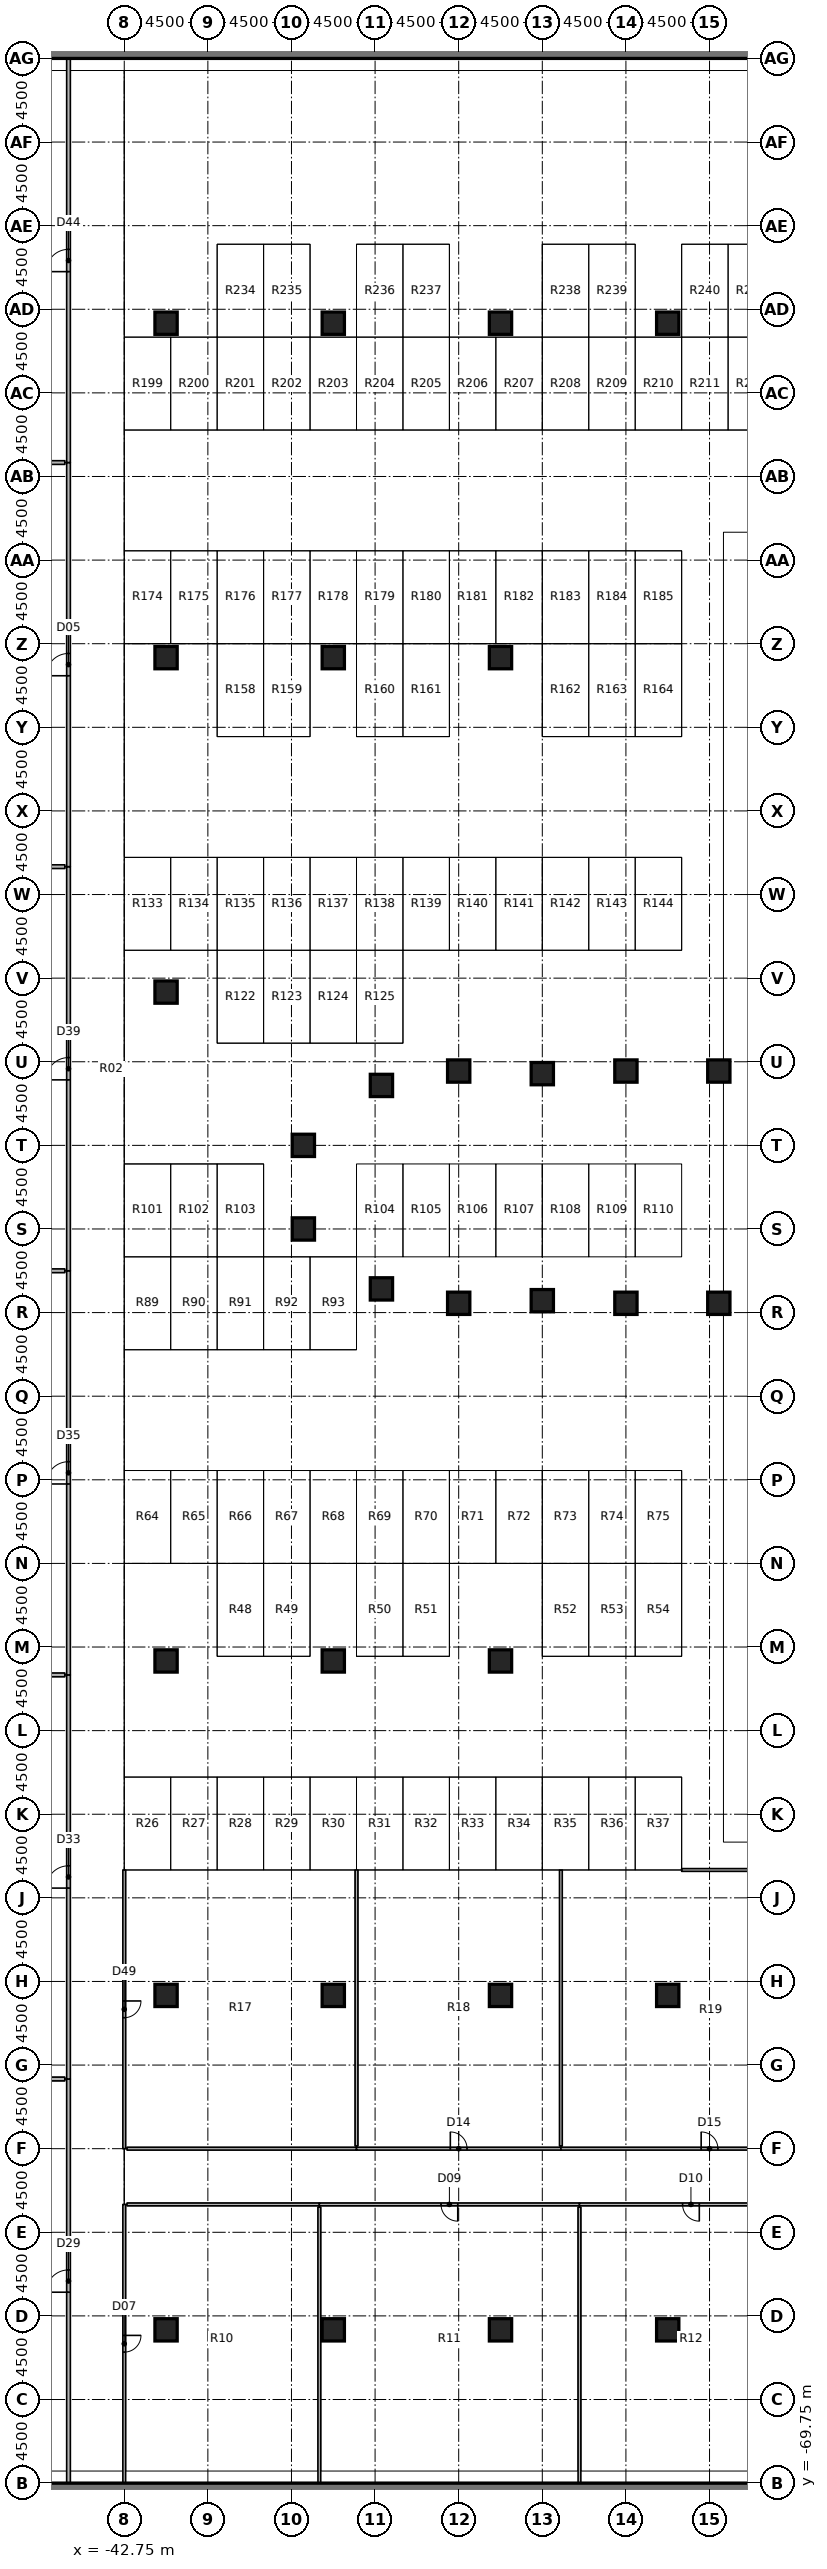
"""IFC4 building model, lengths in metres.
Left out: names, types, materials, properties, quantities, classifications, styles, units other than length and angle.
Written with IfcOpenShell. Run it as: python <this file> out.ifc"""

import sys

from ifc_helpers import new_model, si_unit, direction, frame, frame_2d, origin, origin_2d, place, context, subcontext, project, spatial, rectangle, extrude, element, fill, save


model = new_model("IFC4")
c1 = context("Model", 3, precision=1e-05, world=origin(), true_north=direction((0.0, 1.0)))
c2 = subcontext(c1, "Body", "Model", "MODEL_VIEW")
j1 = project(units=[si_unit("LENGTHUNIT", "METRE"), si_unit("PLANEANGLEUNIT", "RADIAN")], contexts=[c1])
p1 = place(None, origin())
s1 = spatial("IfcSite", under=j1, at=p1, CompositionType="ELEMENT")
p2 = place(p1, origin())
s2 = spatial("IfcBuilding", under=s1, at=p2, CompositionType="ELEMENT")
p3 = place(p2, frame((0.0, 0.0, -4.0)))
s3 = spatial("IfcBuildingStorey", under=s2, at=p3, CompositionType="ELEMENT", Elevation=-4.0)
for number, where, z_axis, x_axis in (
    (1, (-40.5, -61.5, 0.0), (0.0, 0.0, 1.0), (1.0, 0.0, 0.0)),
    (2, (-40.5, -43.5, 0.0), (0.0, 0.0, 1.0), (1.0, 0.0, 0.0)),
    (3, (-40.5, -25.5, 0.0), (0.0, 0.0, 1.0), (1.0, 0.0, 0.0)),
    (4, (-40.5, 10.5, 0.0), (0.0, 0.0, 1.0), (1.0, 0.0, 0.0)),
    (5, (-40.5, 28.5, 0.0), (0.0, 0.0, 1.0), (1.0, 0.0, 0.0)),
    (6, (-40.5, 46.5, 0.0), (0.0, 0.0, 1.0), (1.0, 0.0, 0.0)),
    (7, (-33.11, -2.25, 0.0), (0.0, 0.0, 1.0), (1.0, 0.0, 0.0)),
    (8, (-33.11, 2.25, 0.0), (0.0, 0.0, 1.0), (1.0, 0.0, 0.0)),
    (9, (-31.5, -61.5, 0.0), (0.0, 0.0, 1.0), (1.0, 0.0, 0.0)),
    (10, (-31.5, -43.5, 0.0), (0.0, 0.0, 1.0), (1.0, 0.0, 0.0)),
    (11, (-31.5, -25.5, 0.0), (0.0, 0.0, 1.0), (1.0, 0.0, 0.0)),
    (12, (-31.5, 28.5, 0.0), (0.0, 0.0, 1.0), (1.0, 0.0, 0.0)),
    (13, (-31.5, 46.5, 0.0), (0.0, 0.0, 1.0), (1.0, 0.0, 0.0)),
    (14, (-28.908, -5.475, 0.0), (0.0, 0.0, 1.0), (1.0, 0.0, 0.0)),
    (15, (-28.908, 5.475, 0.0), (0.0, 0.0, 1.0), (1.0, 0.0, 0.0)),
    (16, (-24.75, -6.25, 0.0), (0.0, 0.0, 1.0), (1.0, 0.0, 0.0)),
    (17, (-24.75, 6.25, 0.0), (0.0, 0.0, 1.0), (1.0, 0.0, 0.0)),
    (18, (-22.5, -61.5, 0.0), (0.0, 0.0, 1.0), (1.0, 0.0, 0.0)),
    (19, (-22.5, -43.5, 0.0), (0.0, 0.0, 1.0), (1.0, 0.0, 0.0)),
    (20, (-22.5, -25.5, 0.0), (0.0, 0.0, 1.0), (1.0, 0.0, 0.0)),
    (21, (-22.5, 28.5, 0.0), (0.0, 0.0, 1.0), (1.0, 0.0, 0.0)),
    (22, (-22.5, 46.5, 0.0), (0.0, 0.0, 1.0), (1.0, 0.0, 0.0)),
    (23, (-20.25, -6.11, 0.0), (0.0, 0.0, 1.0), (1.0, 0.0, 0.0)),
    (24, (-20.25, 6.11, 0.0), (0.0, 0.0, 1.0), (1.0, 0.0, 0.0)),
    (25, (-15.75, -6.25, 0.0), (0.0, 0.0, 1.0), (1.0, 0.0, 0.0)),
    (26, (-15.75, 6.25, 0.0), (0.0, 0.0, 1.0), (1.0, 0.0, 0.0)),
    (27, (-13.5, -61.5, 0.0), (0.0, 0.0, 1.0), (1.0, 0.0, 0.0)),
    (28, (-13.5, -43.5, 0.0), (0.0, 0.0, 1.0), (1.0, 0.0, 0.0)),
    (29, (-13.5, 46.5, 0.0), (0.0, 0.0, 1.0), (1.0, 0.0, 0.0)),
    (30, (-10.75, -6.25, 0.0), (0.0, 0.0, 1.0), (1.0, 0.0, 0.0)),
    (31, (-10.75, 6.25, 0.0), (0.0, 0.0, 1.0), (1.0, 0.0, 0.0)),
):
    element("IfcColumn", number, at=place(p3, frame(where, z_axis=z_axis, x_axis=x_axis)), inside=s3, PredefinedType="COLUMN", context=c2, shape_type="SweptSolid", body=[
        extrude(rectangle(XDim=1.2, YDim=1.2, at=origin_2d()), origin(), (0.0, 0.0, 1.0), 3.1),
    ])
for number, where, z_axis, x_axis in (
    (32, (-61.25, -70.0, 0.0), (0.0, 0.0, 1.0), (1.0, 0.0, 0.0)),
    (33, (-61.25, 61.0, 0.0), (0.0, 0.0, 1.0), (1.0, 0.0, 0.0)),
):
    element("IfcWall", number, at=place(p3, frame(where, z_axis=z_axis, x_axis=x_axis)), inside=s3, PredefinedType="SOLIDWALL", context=c2, shape_type="SweptSolid", body=[
        extrude(rectangle(XDim=122.5, YDim=0.5, at=frame_2d((61.25, 0.0))), origin(), (0.0, 0.0, 1.0), 4.0),
    ])
p4 = place(p3, frame((-45.75, -69.75, 0.0), z_axis=(0.0, 0.0, 1.0), x_axis=(0.0, 1.0, 0.0)))
e34 = element("IfcWall", 34, at=p4, inside=s3, PredefinedType="PARTITIONING", context=c2, shape_type="SweptSolid", body=[
    extrude(rectangle(XDim=21.75, YDim=0.2, at=frame_2d((10.875, 0.0))), origin(), (0.0, 0.0, 1.0), 3.1),
])
p5 = place(p4, frame((10.275, 0.0, 0.0)))
e35 = element("IfcOpeningElement", 35, at=p5, cuts=e34, PredefinedType="OPENING", context=c2, shape_type="SweptSolid", body=[
    extrude(rectangle(XDim=1.2, YDim=2.1, at=frame_2d((0.6, 1.05))), frame((0.0, 0.11, 0.0), z_axis=(0.0, -1.0, 0.0), x_axis=(1.0, 0.0, 0.0)), (0.0, 0.0, 1.0), 0.22),
])
p6 = place(p3, frame((-45.75, -48.0, 0.0), z_axis=(0.0, 0.0, 1.0), x_axis=(0.0, 1.0, 0.0)))
e36 = element("IfcWall", 36, at=p6, inside=s3, PredefinedType="PARTITIONING", context=c2, shape_type="SweptSolid", body=[
    extrude(rectangle(XDim=21.75, YDim=0.2, at=frame_2d((10.875, 0.0))), origin(), (0.0, 0.0, 1.0), 3.1),
])
p7 = place(p6, frame((10.275, 0.0, 0.0)))
e37 = element("IfcOpeningElement", 37, at=p7, cuts=e36, PredefinedType="OPENING", context=c2, shape_type="SweptSolid", body=[
    extrude(rectangle(XDim=1.2, YDim=2.1, at=frame_2d((0.6, 1.05))), frame((0.0, 0.11, 0.0), z_axis=(0.0, -1.0, 0.0), x_axis=(1.0, 0.0, 0.0)), (0.0, 0.0, 1.0), 0.22),
])
p8 = place(p3, frame((-45.75, -26.25, 0.0), z_axis=(0.0, 0.0, 1.0), x_axis=(0.0, 1.0, 0.0)))
e38 = element("IfcWall", 38, at=p8, inside=s3, PredefinedType="PARTITIONING", context=c2, shape_type="SweptSolid", body=[
    extrude(rectangle(XDim=21.75, YDim=0.2, at=frame_2d((10.875, 0.0))), origin(), (0.0, 0.0, 1.0), 3.1),
])
p9 = place(p8, frame((10.275, 0.0, 0.0)))
e39 = element("IfcOpeningElement", 39, at=p9, cuts=e38, PredefinedType="OPENING", context=c2, shape_type="SweptSolid", body=[
    extrude(rectangle(XDim=1.2, YDim=2.1, at=frame_2d((0.6, 1.05))), frame((0.0, 0.11, 0.0), z_axis=(0.0, -1.0, 0.0), x_axis=(1.0, 0.0, 0.0)), (0.0, 0.0, 1.0), 0.22),
])
p10 = place(p3, frame((-45.75, -4.5, 0.0), z_axis=(0.0, 0.0, 1.0), x_axis=(0.0, 1.0, 0.0)))
e40 = element("IfcWall", 40, at=p10, inside=s3, PredefinedType="PARTITIONING", context=c2, shape_type="SweptSolid", body=[
    extrude(rectangle(XDim=21.75, YDim=0.2, at=frame_2d((10.875, 0.0))), origin(), (0.0, 0.0, 1.0), 3.1),
])
p11 = place(p10, frame((10.275, 0.0, 0.0)))
e41 = element("IfcOpeningElement", 41, at=p11, cuts=e40, PredefinedType="OPENING", context=c2, shape_type="SweptSolid", body=[
    extrude(rectangle(XDim=1.2, YDim=2.1, at=frame_2d((0.6, 1.05))), frame((0.0, 0.11, 0.0), z_axis=(0.0, -1.0, 0.0), x_axis=(1.0, 0.0, 0.0)), (0.0, 0.0, 1.0), 0.22),
])
p12 = place(p3, frame((-45.75, 17.25, 0.0), z_axis=(0.0, 0.0, 1.0), x_axis=(0.0, 1.0, 0.0)))
e42 = element("IfcWall", 42, at=p12, inside=s3, PredefinedType="PARTITIONING", context=c2, shape_type="SweptSolid", body=[
    extrude(rectangle(XDim=21.75, YDim=0.2, at=frame_2d((10.875, 0.0))), origin(), (0.0, 0.0, 1.0), 3.1),
])
p13 = place(p12, frame((10.275, 0.0, 0.0)))
e43 = element("IfcOpeningElement", 43, at=p13, cuts=e42, PredefinedType="OPENING", context=c2, shape_type="SweptSolid", body=[
    extrude(rectangle(XDim=1.2, YDim=2.1, at=frame_2d((0.6, 1.05))), frame((0.0, 0.11, 0.0), z_axis=(0.0, -1.0, 0.0), x_axis=(1.0, 0.0, 0.0)), (0.0, 0.0, 1.0), 0.22),
])
p14 = place(p3, frame((-45.75, 39.0, 0.0), z_axis=(0.0, 0.0, 1.0), x_axis=(0.0, 1.0, 0.0)))
e44 = element("IfcWall", 44, at=p14, inside=s3, PredefinedType="PARTITIONING", context=c2, shape_type="SweptSolid", body=[
    extrude(rectangle(XDim=21.75, YDim=0.2, at=frame_2d((10.875, 0.0))), origin(), (0.0, 0.0, 1.0), 3.1),
])
p15 = place(p14, frame((10.275, 0.0, 0.0)))
e45 = element("IfcOpeningElement", 45, at=p15, cuts=e44, PredefinedType="OPENING", context=c2, shape_type="SweptSolid", body=[
    extrude(rectangle(XDim=1.2, YDim=2.1, at=frame_2d((0.6, 1.05))), frame((0.0, 0.11, 0.0), z_axis=(0.0, -1.0, 0.0), x_axis=(1.0, 0.0, 0.0)), (0.0, 0.0, 1.0), 0.22),
])
p16 = place(p3, frame((-42.75, -54.75, 0.0), z_axis=(0.0, 0.0, 1.0), x_axis=(0.0, -1.0, 0.0)))
e46 = element("IfcWall", 46, at=p16, inside=s3, PredefinedType="PARTITIONING", context=c2, shape_type="SweptSolid", body=[
    extrude(rectangle(XDim=15.0, YDim=0.15, at=frame_2d((7.5, 0.0))), origin(), (0.0, 0.0, 1.0), 3.1),
])
p17 = place(p16, frame((7.05, 0.0, 0.0)))
e47 = element("IfcOpeningElement", 47, at=p17, cuts=e46, PredefinedType="OPENING", context=c2, shape_type="SweptSolid", body=[
    extrude(rectangle(XDim=0.9, YDim=2.1, at=frame_2d((0.45, 1.05))), frame((0.0, 0.085, 0.0), z_axis=(0.0, -1.0, 0.0), x_axis=(1.0, 0.0, 0.0)), (0.0, 0.0, 1.0), 0.17),
])
p18 = place(p3, frame((-42.75, -36.75, 0.0), z_axis=(0.0, 0.0, 1.0), x_axis=(0.0, -1.0, 0.0)))
e48 = element("IfcWall", 48, at=p18, inside=s3, PredefinedType="PARTITIONING", context=c2, shape_type="SweptSolid", body=[
    extrude(rectangle(XDim=15.0, YDim=0.15, at=frame_2d((7.5, 0.0))), origin(), (0.0, 0.0, 1.0), 3.1),
])
p19 = place(p18, frame((7.05, 0.0, 0.0)))
e49 = element("IfcOpeningElement", 49, at=p19, cuts=e48, PredefinedType="OPENING", context=c2, shape_type="SweptSolid", body=[
    extrude(rectangle(XDim=0.9, YDim=2.1, at=frame_2d((0.45, 1.05))), frame((0.0, 0.085, 0.0), z_axis=(0.0, -1.0, 0.0), x_axis=(1.0, 0.0, 0.0)), (0.0, 0.0, 1.0), 0.17),
])
for number, where, z_axis, x_axis in (
    (50, (-60.75, -48.0, 0.0), (0.0, 0.0, 1.0), (1.0, 0.0, 0.0)),
    (51, (-60.75, -26.25, 0.0), (0.0, 0.0, 1.0), (1.0, 0.0, 0.0)),
    (52, (-60.75, -4.5, 0.0), (0.0, 0.0, 1.0), (1.0, 0.0, 0.0)),
    (53, (-60.75, 17.25, 0.0), (0.0, 0.0, 1.0), (1.0, 0.0, 0.0)),
    (54, (-60.75, 39.0, 0.0), (0.0, 0.0, 1.0), (1.0, 0.0, 0.0)),
):
    element("IfcWall", number, at=place(p3, frame(where, z_axis=z_axis, x_axis=x_axis)), inside=s3, PredefinedType="PARTITIONING", context=c2, shape_type="SweptSolid", body=[
        extrude(rectangle(XDim=14.8, YDim=0.2, at=frame_2d((7.4, 0.0))), origin(), (0.0, 0.0, 1.0), 3.1),
    ])
p20 = place(p3, frame((-32.25, -54.75, 0.0), z_axis=(0.0, 0.0, 1.0), x_axis=(-1.0, 0.0, 0.0)))
e55 = element("IfcWall", 55, at=p20, inside=s3, PredefinedType="PARTITIONING", context=c2, shape_type="SweptSolid", body=[
    extrude(rectangle(XDim=10.35, YDim=0.15, at=frame_2d((5.175, 0.0))), origin(), (0.0, 0.0, 1.0), 3.1),
])
p21 = place(p3, frame((-18.25, -54.75, 0.0), z_axis=(0.0, 0.0, 1.0), x_axis=(-1.0, 0.0, 0.0)))
e56 = element("IfcWall", 56, at=p21, inside=s3, PredefinedType="PARTITIONING", context=c2, shape_type="SweptSolid", body=[
    extrude(rectangle(XDim=14.0, YDim=0.15, at=frame_2d((7.0, 0.0))), origin(), (0.0, 0.0, 1.0), 3.1),
])
p22 = place(p21, frame((6.55, 0.0, 0.0)))
e57 = element("IfcOpeningElement", 57, at=p22, cuts=e56, PredefinedType="OPENING", context=c2, shape_type="SweptSolid", body=[
    extrude(rectangle(XDim=0.9, YDim=2.1, at=frame_2d((0.45, 1.05))), frame((0.0, 0.085, 0.0), z_axis=(0.0, -1.0, 0.0), x_axis=(1.0, 0.0, 0.0)), (0.0, 0.0, 1.0), 0.17),
])
p23 = place(p3, frame((-6.25, -54.75, 0.0), z_axis=(0.0, 0.0, 1.0), x_axis=(-1.0, 0.0, 0.0)))
e58 = element("IfcWall", 58, at=p23, inside=s3, PredefinedType="PARTITIONING", context=c2, shape_type="SweptSolid", body=[
    extrude(rectangle(XDim=12.0, YDim=0.15, at=frame_2d((6.0, 0.0))), origin(), (0.0, 0.0, 1.0), 3.1),
])
p24 = place(p23, frame((5.55, 0.0, 0.0)))
e59 = element("IfcOpeningElement", 59, at=p24, cuts=e58, PredefinedType="OPENING", context=c2, shape_type="SweptSolid", body=[
    extrude(rectangle(XDim=0.9, YDim=2.1, at=frame_2d((0.45, 1.05))), frame((0.0, 0.085, 0.0), z_axis=(0.0, -1.0, 0.0), x_axis=(1.0, 0.0, 0.0)), (0.0, 0.0, 1.0), 0.17),
])
p25 = place(p3, frame((-42.6, -51.75, 0.0), z_axis=(0.0, 0.0, 1.0), x_axis=(1.0, 0.0, 0.0)))
e60 = element("IfcWall", 60, at=p25, inside=s3, PredefinedType="PARTITIONING", context=c2, shape_type="SweptSolid", body=[
    extrude(rectangle(XDim=12.35, YDim=0.15, at=frame_2d((6.175, 0.0))), origin(), (0.0, 0.0, 1.0), 3.1),
])
p26 = place(p3, frame((-30.25, -51.75, 0.0), z_axis=(0.0, 0.0, 1.0), x_axis=(1.0, 0.0, 0.0)))
e61 = element("IfcWall", 61, at=p26, inside=s3, PredefinedType="PARTITIONING", context=c2, shape_type="SweptSolid", body=[
    extrude(rectangle(XDim=11.0, YDim=0.15, at=frame_2d((5.5, 0.0))), origin(), (0.0, 0.0, 1.0), 3.1),
])
p27 = place(p26, frame((5.05, 0.0, 0.0)))
e62 = element("IfcOpeningElement", 62, at=p27, cuts=e61, PredefinedType="OPENING", context=c2, shape_type="SweptSolid", body=[
    extrude(rectangle(XDim=0.9, YDim=2.1, at=frame_2d((0.45, 1.05))), frame((0.0, 0.085, 0.0), z_axis=(0.0, -1.0, 0.0), x_axis=(1.0, 0.0, 0.0)), (0.0, 0.0, 1.0), 0.17),
])
p28 = place(p3, frame((-19.25, -51.75, 0.0), z_axis=(0.0, 0.0, 1.0), x_axis=(1.0, 0.0, 0.0)))
e63 = element("IfcWall", 63, at=p28, inside=s3, PredefinedType="PARTITIONING", context=c2, shape_type="SweptSolid", body=[
    extrude(rectangle(XDim=16.0, YDim=0.15, at=frame_2d((8.0, 0.0))), origin(), (0.0, 0.0, 1.0), 3.1),
])
p29 = place(p28, frame((7.55, 0.0, 0.0)))
e64 = element("IfcOpeningElement", 64, at=p29, cuts=e63, PredefinedType="OPENING", context=c2, shape_type="SweptSolid", body=[
    extrude(rectangle(XDim=0.9, YDim=2.1, at=frame_2d((0.45, 1.05))), frame((0.0, 0.085, 0.0), z_axis=(0.0, -1.0, 0.0), x_axis=(1.0, 0.0, 0.0)), (0.0, 0.0, 1.0), 0.17),
])
for number, where, z_axis, x_axis in (
    (65, (-32.25, -54.9, 0.0), (0.0, 0.0, 1.0), (0.0, -1.0, 0.0)),
    (66, (-18.25, -54.9, 0.0), (0.0, 0.0, 1.0), (0.0, -1.0, 0.0)),
    (67, (-30.25, -36.75, 0.0), (0.0, 0.0, 1.0), (0.0, -1.0, 0.0)),
    (68, (-19.25, -36.75, 0.0), (0.0, 0.0, 1.0), (0.0, -1.0, 0.0)),
):
    element("IfcWall", number, at=place(p3, frame(where, z_axis=z_axis, x_axis=x_axis)), inside=s3, PredefinedType="PARTITIONING", context=c2, shape_type="SweptSolid", body=[
        extrude(rectangle(XDim=14.85, YDim=0.15, at=frame_2d((7.425, 0.0))), origin(), (0.0, 0.0, 1.0), 3.1),
    ])
p30 = place(p3, frame((-12.75, -36.75, 0.0), z_axis=(0.0, 0.0, 1.0), x_axis=(1.0, 0.0, 0.0)))
e69 = element("IfcWall", 69, at=p30, inside=s3, PredefinedType="PARTITIONING", context=c2, shape_type="SweptSolid", body=[
    extrude(rectangle(XDim=9.35, YDim=0.15, at=frame_2d((4.675, 0.0))), origin(), (0.0, 0.0, 1.0), 3.1),
])
p31 = place(p5, origin())
e70 = element("IfcDoor", 70, at=p31, inside=s3, OperationType="SINGLE_SWING_LEFT", PredefinedType="DOOR", context=c2, shape_type="SweptSolid", body=[
    extrude(rectangle(XDim=1.2, YDim=2.1, at=frame_2d((0.6, 1.05))), frame((0.0, 0.025, 0.0), z_axis=(0.0, -1.0, 0.0), x_axis=(1.0, 0.0, 0.0)), (0.0, 0.0, 1.0), 0.05),
])
fill(e35, e70)
p32 = place(p7, origin())
e71 = element("IfcDoor", 71, at=p32, inside=s3, OperationType="SINGLE_SWING_LEFT", PredefinedType="DOOR", context=c2, shape_type="SweptSolid", body=[
    extrude(rectangle(XDim=1.2, YDim=2.1, at=frame_2d((0.6, 1.05))), frame((0.0, 0.025, 0.0), z_axis=(0.0, -1.0, 0.0), x_axis=(1.0, 0.0, 0.0)), (0.0, 0.0, 1.0), 0.05),
])
fill(e37, e71)
p33 = place(p9, origin())
e72 = element("IfcDoor", 72, at=p33, inside=s3, OperationType="SINGLE_SWING_LEFT", PredefinedType="DOOR", context=c2, shape_type="SweptSolid", body=[
    extrude(rectangle(XDim=1.2, YDim=2.1, at=frame_2d((0.6, 1.05))), frame((0.0, 0.025, 0.0), z_axis=(0.0, -1.0, 0.0), x_axis=(1.0, 0.0, 0.0)), (0.0, 0.0, 1.0), 0.05),
])
fill(e39, e72)
p34 = place(p11, origin())
e73 = element("IfcDoor", 73, at=p34, inside=s3, OperationType="SINGLE_SWING_LEFT", PredefinedType="DOOR", context=c2, shape_type="SweptSolid", body=[
    extrude(rectangle(XDim=1.2, YDim=2.1, at=frame_2d((0.6, 1.05))), frame((0.0, 0.025, 0.0), z_axis=(0.0, -1.0, 0.0), x_axis=(1.0, 0.0, 0.0)), (0.0, 0.0, 1.0), 0.05),
])
fill(e41, e73)
p35 = place(p13, origin())
e74 = element("IfcDoor", 74, at=p35, inside=s3, OperationType="SINGLE_SWING_LEFT", PredefinedType="DOOR", context=c2, shape_type="SweptSolid", body=[
    extrude(rectangle(XDim=1.2, YDim=2.1, at=frame_2d((0.6, 1.05))), frame((0.0, 0.025, 0.0), z_axis=(0.0, -1.0, 0.0), x_axis=(1.0, 0.0, 0.0)), (0.0, 0.0, 1.0), 0.05),
])
fill(e43, e74)
p36 = place(p15, origin())
e75 = element("IfcDoor", 75, at=p36, inside=s3, OperationType="SINGLE_SWING_LEFT", PredefinedType="DOOR", context=c2, shape_type="SweptSolid", body=[
    extrude(rectangle(XDim=1.2, YDim=2.1, at=frame_2d((0.6, 1.05))), frame((0.0, 0.025, 0.0), z_axis=(0.0, -1.0, 0.0), x_axis=(1.0, 0.0, 0.0)), (0.0, 0.0, 1.0), 0.05),
])
fill(e45, e75)
p37 = place(p17, origin())
e76 = element("IfcDoor", 76, at=p37, inside=s3, OperationType="SINGLE_SWING_LEFT", PredefinedType="DOOR", context=c2, shape_type="SweptSolid", body=[
    extrude(rectangle(XDim=0.9, YDim=2.1, at=frame_2d((0.45, 1.05))), frame((0.0, 0.025, 0.0), z_axis=(0.0, -1.0, 0.0), x_axis=(1.0, 0.0, 0.0)), (0.0, 0.0, 1.0), 0.05),
])
fill(e47, e76)
p38 = place(p19, origin())
e77 = element("IfcDoor", 77, at=p38, inside=s3, OperationType="SINGLE_SWING_LEFT", PredefinedType="DOOR", context=c2, shape_type="SweptSolid", body=[
    extrude(rectangle(XDim=0.9, YDim=2.1, at=frame_2d((0.45, 1.05))), frame((0.0, 0.025, 0.0), z_axis=(0.0, -1.0, 0.0), x_axis=(1.0, 0.0, 0.0)), (0.0, 0.0, 1.0), 0.05),
])
fill(e49, e77)
p39 = place(p22, origin())
e78 = element("IfcDoor", 78, at=p39, inside=s3, OperationType="SINGLE_SWING_LEFT", PredefinedType="DOOR", context=c2, shape_type="SweptSolid", body=[
    extrude(rectangle(XDim=0.9, YDim=2.1, at=frame_2d((0.45, 1.05))), frame((0.0, 0.025, 0.0), z_axis=(0.0, -1.0, 0.0), x_axis=(1.0, 0.0, 0.0)), (0.0, 0.0, 1.0), 0.05),
])
fill(e57, e78)
p40 = place(p24, origin())
e79 = element("IfcDoor", 79, at=p40, inside=s3, OperationType="SINGLE_SWING_LEFT", PredefinedType="DOOR", context=c2, shape_type="SweptSolid", body=[
    extrude(rectangle(XDim=0.9, YDim=2.1, at=frame_2d((0.45, 1.05))), frame((0.0, 0.025, 0.0), z_axis=(0.0, -1.0, 0.0), x_axis=(1.0, 0.0, 0.0)), (0.0, 0.0, 1.0), 0.05),
])
fill(e59, e79)
p41 = place(p27, origin())
e80 = element("IfcDoor", 80, at=p41, inside=s3, OperationType="SINGLE_SWING_LEFT", PredefinedType="DOOR", context=c2, shape_type="SweptSolid", body=[
    extrude(rectangle(XDim=0.9, YDim=2.1, at=frame_2d((0.45, 1.05))), frame((0.0, 0.025, 0.0), z_axis=(0.0, -1.0, 0.0), x_axis=(1.0, 0.0, 0.0)), (0.0, 0.0, 1.0), 0.05),
])
fill(e62, e80)
p42 = place(p29, origin())
e81 = element("IfcDoor", 81, at=p42, inside=s3, OperationType="SINGLE_SWING_LEFT", PredefinedType="DOOR", context=c2, shape_type="SweptSolid", body=[
    extrude(rectangle(XDim=0.9, YDim=2.1, at=frame_2d((0.45, 1.05))), frame((0.0, 0.025, 0.0), z_axis=(0.0, -1.0, 0.0), x_axis=(1.0, 0.0, 0.0)), (0.0, 0.0, 1.0), 0.05),
])
fill(e64, e81)
save(model, sys.argv[1])
